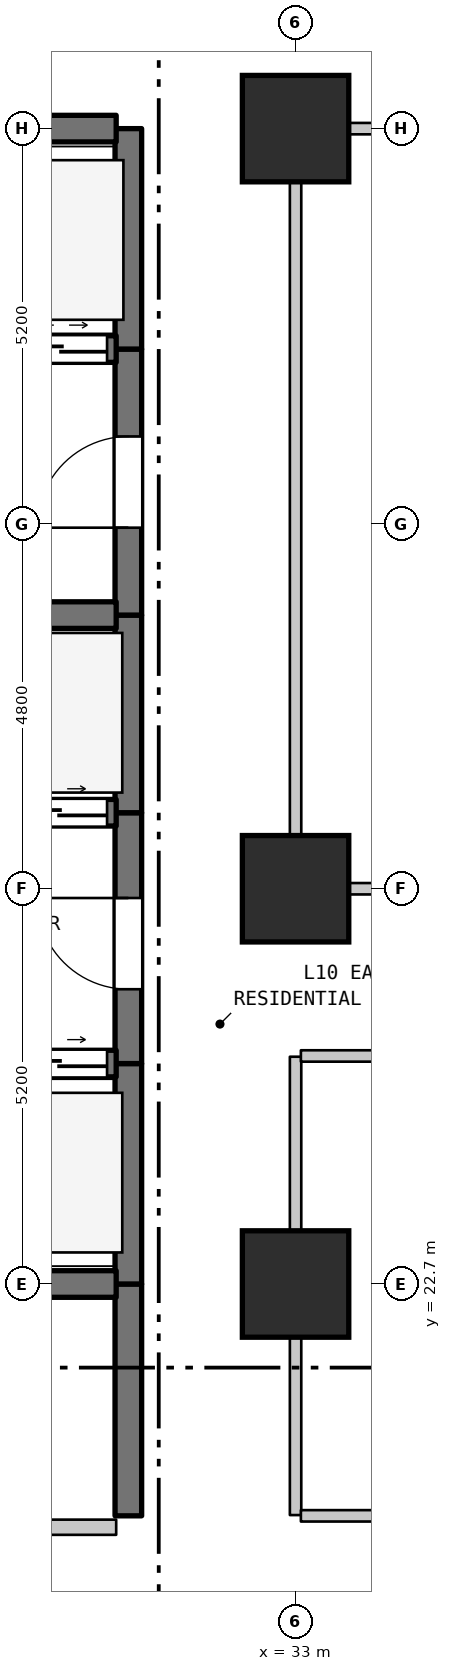
"""IFC4 building model, lengths in metres.
Left out: names, types, materials, properties, quantities, classifications, styles, units other than length and angle.
Written with IfcOpenShell. Run it as: python <this file> out.ifc"""

import sys

from ifc_helpers import new_model, si_unit, direction, frame, frame_2d, origin, origin_2d, place, context, subcontext, project, spatial, rectangle, extrude, element, fill, save


model = new_model("IFC4")
c1 = context("Model", 3, precision=1e-05, world=origin(), true_north=direction((0.0, 1.0)))
c2 = subcontext(c1, "Body", "Model", "MODEL_VIEW")
j1 = project(units=[si_unit("LENGTHUNIT", "METRE"), si_unit("PLANEANGLEUNIT", "RADIAN")], contexts=[c1])
p1 = place(None, origin())
s1 = spatial("IfcSite", under=j1, at=p1, CompositionType="ELEMENT")
p2 = place(p1, origin())
s2 = spatial("IfcBuilding", under=s1, at=p2, CompositionType="ELEMENT")
p3 = place(p2, frame((0.0, 0.0, 46.2)))
s3 = spatial("IfcBuildingStorey", under=s2, at=p3, CompositionType="ELEMENT", Elevation=46.2)
for number, where, z_axis, x_axis in (
    (1, (33.0, 22.7, 0.0), (0.0, 0.0, 1.0), (1.0, 0.0, 0.0)),
    (2, (33.0, 27.9, 0.0), (0.0, 0.0, 1.0), (1.0, 0.0, 0.0)),
    (3, (33.0, 37.9, 0.0), (0.0, 0.0, 1.0), (1.0, 0.0, 0.0)),
):
    element("IfcColumn", number, at=place(p3, frame(where, z_axis=z_axis, x_axis=x_axis)), inside=s3, PredefinedType="COLUMN", context=c2, shape_type="SweptSolid", body=[
        extrude(rectangle(XDim=1.4, YDim=1.4, at=origin_2d()), origin(), (0.0, 0.0, 1.0), 3.7),
    ])
p4 = place(p3, frame((30.8, 19.65, 0.0), z_axis=(0.0, 0.0, 1.0), x_axis=(0.0, 1.0, 0.0)))
e4 = element("IfcWall", 4, at=p4, inside=s3, PredefinedType="SHEAR", context=c2, shape_type="SweptSolid", body=[
    extrude(rectangle(XDim=3.05, YDim=0.35, at=frame_2d((1.525, 0.0))), origin(), (0.0, 0.0, 1.0), 3.385),
])
p5 = place(p3, frame((30.8, 22.7, 0.0), z_axis=(0.0, 0.0, 1.0), x_axis=(0.0, 1.0, 0.0)))
e5 = element("IfcWall", 5, at=p5, inside=s3, PredefinedType="SHEAR", context=c2, shape_type="SweptSolid", body=[
    extrude(rectangle(XDim=2.9, YDim=0.35, at=frame_2d((1.45, 0.0))), origin(), (0.0, 0.0, 1.0), 3.385),
])
p6 = place(p3, frame((30.8, 25.6, 0.0), z_axis=(0.0, 0.0, 1.0), x_axis=(0.0, 1.0, 0.0)))
e6 = element("IfcWall", 6, at=p6, inside=s3, PredefinedType="SHEAR", context=c2, shape_type="SweptSolid", body=[
    extrude(rectangle(XDim=3.3, YDim=0.35, at=frame_2d((1.65, 0.0))), origin(), (0.0, 0.0, 1.0), 3.385),
])
p7 = place(p6, frame((0.978, 0.0, 0.0)))
e7 = element("IfcOpeningElement", 7, at=p7, cuts=e6, PredefinedType="OPENING", context=c2, shape_type="SweptSolid", body=[
    extrude(rectangle(XDim=1.2, YDim=2.2, at=frame_2d((0.6, 1.1))), frame((0.0, 0.185, 0.0), z_axis=(0.0, -1.0, 0.0), x_axis=(1.0, 0.0, 0.0)), (0.0, 0.0, 1.0), 0.37),
])
p8 = place(p3, frame((30.8, 28.9, 0.0), z_axis=(0.0, 0.0, 1.0), x_axis=(0.0, 1.0, 0.0)))
e8 = element("IfcWall", 8, at=p8, inside=s3, PredefinedType="SHEAR", context=c2, shape_type="SweptSolid", body=[
    extrude(rectangle(XDim=2.6, YDim=0.35, at=frame_2d((1.3, 0.0))), origin(), (0.0, 0.0, 1.0), 3.385),
])
p9 = place(p3, frame((30.8, 31.5, 0.0), z_axis=(0.0, 0.0, 1.0), x_axis=(0.0, 1.0, 0.0)))
e9 = element("IfcWall", 9, at=p9, inside=s3, PredefinedType="SHEAR", context=c2, shape_type="SweptSolid", body=[
    extrude(rectangle(XDim=3.5, YDim=0.35, at=frame_2d((1.75, 0.0))), origin(), (0.0, 0.0, 1.0), 3.385),
])
p10 = place(p9, frame((1.15, 0.0, 0.0)))
e10 = element("IfcOpeningElement", 10, at=p10, cuts=e9, PredefinedType="OPENING", context=c2, shape_type="SweptSolid", body=[
    extrude(rectangle(XDim=1.2, YDim=2.2, at=frame_2d((0.6, 1.1))), frame((0.0, 0.185, 0.0), z_axis=(0.0, -1.0, 0.0), x_axis=(1.0, 0.0, 0.0)), (0.0, 0.0, 1.0), 0.37),
])
p11 = place(p3, frame((30.8, 35.0, 0.0), z_axis=(0.0, 0.0, 1.0), x_axis=(0.0, 1.0, 0.0)))
e11 = element("IfcWall", 11, at=p11, inside=s3, PredefinedType="SHEAR", context=c2, shape_type="SweptSolid", body=[
    extrude(rectangle(XDim=2.9, YDim=0.35, at=frame_2d((1.45, 0.0))), origin(), (0.0, 0.0, 1.0), 3.385),
])
p12 = place(p3, frame((33.0, 19.66, 0.0), z_axis=(0.0, 0.0, 1.0), x_axis=(0.0, 1.0, 0.0)))
e12 = element("IfcWall", 12, at=p12, inside=s3, PredefinedType="STANDARD", context=c2, shape_type="SweptSolid", body=[
    extrude(rectangle(XDim=6.03, YDim=0.15, at=frame_2d((3.015, 0.0))), origin(), (0.0, 0.0, 1.0), 2.885),
])
p13 = place(p3, frame((33.0, 27.91, 0.0), z_axis=(0.0, 0.0, 1.0), x_axis=(0.0, 1.0, 0.0)))
e13 = element("IfcWall", 13, at=p13, inside=s3, PredefinedType="STANDARD", context=c2, shape_type="SweptSolid", body=[
    extrude(rectangle(XDim=9.98, YDim=0.15, at=frame_2d((4.99, 0.0))), origin(), (0.0, 0.0, 1.0), 2.885),
])
p14 = place(p3, frame((25.985, 19.5, 0.0), z_axis=(0.0, 0.0, 1.0), x_axis=(1.0, 0.0, 0.0)))
e14 = element("IfcWall", 14, at=p14, inside=s3, PredefinedType="STANDARD", context=c2, shape_type="SweptSolid", body=[
    extrude(rectangle(XDim=4.655, YDim=0.2, at=frame_2d((2.327, 0.0))), origin(), (0.0, 0.0, 1.0), 3.385),
])
p15 = place(p14, frame((1.845, 0.0, 0.0)))
e15 = element("IfcOpeningElement", 15, at=p15, cuts=e14, PredefinedType="OPENING", context=c2, shape_type="SweptSolid", body=[
    extrude(rectangle(XDim=0.9, YDim=2.15, at=frame_2d((0.45, 1.075))), frame((0.0, 0.11, 0.0), z_axis=(0.0, -1.0, 0.0), x_axis=(1.0, 0.0, 0.0)), (0.0, 0.0, 1.0), 0.22),
])
p16 = place(p3, frame((33.07, 19.65, 0.0), z_axis=(0.0, 0.0, 1.0), x_axis=(1.0, 0.0, 0.0)))
e16 = element("IfcWall", 16, at=p16, inside=s3, PredefinedType="STANDARD", context=c2, shape_type="SweptSolid", body=[
    extrude(rectangle(XDim=33.27, YDim=0.15, at=frame_2d((16.635, 0.0))), origin(), (0.0, 0.0, 1.0), 3.385),
])
p17 = place(p16, frame((16.065, 0.0, 0.0)))
e17 = element("IfcOpeningElement", 17, at=p17, cuts=e16, PredefinedType="OPENING", context=c2, shape_type="SweptSolid", body=[
    extrude(rectangle(XDim=1.0, YDim=2.15, at=frame_2d((0.5, 1.075))), frame((0.0, 0.085, 0.0), z_axis=(0.0, -1.0, 0.0), x_axis=(1.0, 0.0, 0.0)), (0.0, 0.0, 1.0), 0.17),
])
p18 = place(p3, frame((27.46, 22.7, 0.0), z_axis=(0.0, 0.0, 1.0), x_axis=(1.0, 0.0, 0.0)))
e18 = element("IfcWall", 18, at=p18, inside=s3, PredefinedType="SHEAR", context=c2, shape_type="SweptSolid", body=[
    extrude(rectangle(XDim=3.18, YDim=0.35, at=frame_2d((1.59, 0.0))), origin(), (0.0, 0.0, 1.0), 3.385),
])
p19 = place(p3, frame((27.46, 25.6, 0.0), z_axis=(0.0, 0.0, 1.0), x_axis=(1.0, 0.0, 0.0)))
e19 = element("IfcWall", 19, at=p19, inside=s3, PredefinedType="SHEAR", context=c2, shape_type="SweptSolid", body=[
    extrude(rectangle(XDim=3.18, YDim=0.35, at=frame_2d((1.59, 0.0))), origin(), (0.0, 0.0, 1.0), 3.385),
])
p20 = place(p19, frame((0.12, 0.0, 0.0)))
e20 = element("IfcOpeningElement", 20, at=p20, cuts=e19, PredefinedType="OPENING", context=c2, shape_type="SweptSolid", body=[
    extrude(rectangle(XDim=1.25, YDim=2.2, at=frame_2d((0.625, 1.1))), frame((0.0, 0.185, 0.0), z_axis=(0.0, -1.0, 0.0), x_axis=(1.0, 0.0, 0.0)), (0.0, 0.0, 1.0), 0.37),
])
p21 = place(p19, frame((1.81, 0.0, 0.0)))
e21 = element("IfcOpeningElement", 21, at=p21, cuts=e19, PredefinedType="OPENING", context=c2, shape_type="SweptSolid", body=[
    extrude(rectangle(XDim=1.25, YDim=2.2, at=frame_2d((0.625, 1.1))), frame((0.0, 0.185, 0.0), z_axis=(0.0, -1.0, 0.0), x_axis=(1.0, 0.0, 0.0)), (0.0, 0.0, 1.0), 0.37),
])
p22 = place(p3, frame((33.07, 25.7, 0.0), z_axis=(0.0, 0.0, 1.0), x_axis=(1.0, 0.0, 0.0)))
e22 = element("IfcWall", 22, at=p22, inside=s3, PredefinedType="STANDARD", context=c2, shape_type="SweptSolid", body=[
    extrude(rectangle(XDim=30.87, YDim=0.15, at=frame_2d((15.435, 0.0))), origin(), (0.0, 0.0, 1.0), 3.385),
])
p23 = place(p3, frame((33.07, 27.9, 0.0), z_axis=(0.0, 0.0, 1.0), x_axis=(1.0, 0.0, 0.0)))
e23 = element("IfcWall", 23, at=p23, inside=s3, PredefinedType="STANDARD", context=c2, shape_type="SweptSolid", body=[
    extrude(rectangle(XDim=30.87, YDim=0.15, at=frame_2d((15.435, 0.0))), origin(), (0.0, 0.0, 1.0), 2.885),
])
p24 = place(p23, frame((14.935, 0.0, 0.0)))
e24 = element("IfcOpeningElement", 24, at=p24, cuts=e23, PredefinedType="OPENING", context=c2, shape_type="SweptSolid", body=[
    extrude(rectangle(XDim=1.0, YDim=2.15, at=frame_2d((0.5, 1.075))), frame((0.0, 0.085, 0.0), z_axis=(0.0, -1.0, 0.0), x_axis=(1.0, 0.0, 0.0)), (0.0, 0.0, 1.0), 0.17),
])
p25 = place(p3, frame((27.46, 28.9, 0.0), z_axis=(0.0, 0.0, 1.0), x_axis=(1.0, 0.0, 0.0)))
e25 = element("IfcWall", 25, at=p25, inside=s3, PredefinedType="SHEAR", context=c2, shape_type="SweptSolid", body=[
    extrude(rectangle(XDim=3.18, YDim=0.35, at=frame_2d((1.59, 0.0))), origin(), (0.0, 0.0, 1.0), 3.385),
])
p26 = place(p25, frame((0.12, 0.0, 0.0)))
e26 = element("IfcOpeningElement", 26, at=p26, cuts=e25, PredefinedType="OPENING", context=c2, shape_type="SweptSolid", body=[
    extrude(rectangle(XDim=1.25, YDim=2.2, at=frame_2d((0.625, 1.1))), frame((0.0, 0.185, 0.0), z_axis=(0.0, -1.0, 0.0), x_axis=(1.0, 0.0, 0.0)), (0.0, 0.0, 1.0), 0.37),
])
p27 = place(p25, frame((1.81, 0.0, 0.0)))
e27 = element("IfcOpeningElement", 27, at=p27, cuts=e25, PredefinedType="OPENING", context=c2, shape_type="SweptSolid", body=[
    extrude(rectangle(XDim=1.25, YDim=2.2, at=frame_2d((0.625, 1.1))), frame((0.0, 0.185, 0.0), z_axis=(0.0, -1.0, 0.0), x_axis=(1.0, 0.0, 0.0)), (0.0, 0.0, 1.0), 0.37),
])
p28 = place(p3, frame((27.46, 31.5, 0.0), z_axis=(0.0, 0.0, 1.0), x_axis=(1.0, 0.0, 0.0)))
e28 = element("IfcWall", 28, at=p28, inside=s3, PredefinedType="SHEAR", context=c2, shape_type="SweptSolid", body=[
    extrude(rectangle(XDim=3.18, YDim=0.35, at=frame_2d((1.59, 0.0))), origin(), (0.0, 0.0, 1.0), 3.385),
])
p29 = place(p3, frame((19.16, 35.0, 0.0), z_axis=(0.0, 0.0, 1.0), x_axis=(1.0, 0.0, 0.0)))
e29 = element("IfcWall", 29, at=p29, inside=s3, PredefinedType="SHEAR", context=c2, shape_type="SweptSolid", body=[
    extrude(rectangle(XDim=11.48, YDim=0.35, at=frame_2d((5.74, 0.0))), origin(), (0.0, 0.0, 1.0), 3.385),
])
p30 = place(p29, frame((0.365, 0.0, 0.0)))
e30 = element("IfcOpeningElement", 30, at=p30, cuts=e29, PredefinedType="OPENING", context=c2, shape_type="SweptSolid", body=[
    extrude(rectangle(XDim=1.35, YDim=2.2, at=frame_2d((0.675, 1.1))), frame((0.0, 0.185, 0.0), z_axis=(0.0, -1.0, 0.0), x_axis=(1.0, 0.0, 0.0)), (0.0, 0.0, 1.0), 0.37),
])
p31 = place(p29, frame((2.765, 0.0, 0.0)))
e31 = element("IfcOpeningElement", 31, at=p31, cuts=e29, PredefinedType="OPENING", context=c2, shape_type="SweptSolid", body=[
    extrude(rectangle(XDim=1.35, YDim=2.2, at=frame_2d((0.675, 1.1))), frame((0.0, 0.185, 0.0), z_axis=(0.0, -1.0, 0.0), x_axis=(1.0, 0.0, 0.0)), (0.0, 0.0, 1.0), 0.37),
])
p32 = place(p29, frame((4.915, 0.0, 0.0)))
e32 = element("IfcOpeningElement", 32, at=p32, cuts=e29, PredefinedType="OPENING", context=c2, shape_type="SweptSolid", body=[
    extrude(rectangle(XDim=1.2, YDim=2.2, at=frame_2d((0.6, 1.1))), frame((0.0, 0.185, 0.0), z_axis=(0.0, -1.0, 0.0), x_axis=(1.0, 0.0, 0.0)), (0.0, 0.0, 1.0), 0.37),
])
p33 = place(p29, frame((6.665, 0.0, 0.0)))
e33 = element("IfcOpeningElement", 33, at=p33, cuts=e29, PredefinedType="OPENING", context=c2, shape_type="SweptSolid", body=[
    extrude(rectangle(XDim=1.2, YDim=2.2, at=frame_2d((0.6, 1.1))), frame((0.0, 0.185, 0.0), z_axis=(0.0, -1.0, 0.0), x_axis=(1.0, 0.0, 0.0)), (0.0, 0.0, 1.0), 0.37),
])
p34 = place(p29, frame((8.415, 0.0, 0.0)))
e34 = element("IfcOpeningElement", 34, at=p34, cuts=e29, PredefinedType="OPENING", context=c2, shape_type="SweptSolid", body=[
    extrude(rectangle(XDim=1.2, YDim=2.2, at=frame_2d((0.6, 1.1))), frame((0.0, 0.185, 0.0), z_axis=(0.0, -1.0, 0.0), x_axis=(1.0, 0.0, 0.0)), (0.0, 0.0, 1.0), 0.37),
])
p35 = place(p29, frame((10.16, 0.0, 0.0)))
e35 = element("IfcOpeningElement", 35, at=p35, cuts=e29, PredefinedType="OPENING", context=c2, shape_type="SweptSolid", body=[
    extrude(rectangle(XDim=1.2, YDim=2.2, at=frame_2d((0.6, 1.1))), frame((0.0, 0.185, 0.0), z_axis=(0.0, -1.0, 0.0), x_axis=(1.0, 0.0, 0.0)), (0.0, 0.0, 1.0), 0.37),
])
p36 = place(p3, frame((19.16, 37.9, 0.0), z_axis=(0.0, 0.0, 1.0), x_axis=(1.0, 0.0, 0.0)))
e36 = element("IfcWall", 36, at=p36, inside=s3, PredefinedType="SHEAR", context=c2, shape_type="SweptSolid", body=[
    extrude(rectangle(XDim=11.48, YDim=0.35, at=frame_2d((5.74, 0.0))), origin(), (0.0, 0.0, 1.0), 3.385),
])
p37 = place(p3, frame((33.07, 37.9, 0.0), z_axis=(0.0, 0.0, 1.0), x_axis=(1.0, 0.0, 0.0)))
e37 = element("IfcWall", 37, at=p37, inside=s3, PredefinedType="STANDARD", context=c2, shape_type="SweptSolid", body=[
    extrude(rectangle(XDim=26.935, YDim=0.15, at=frame_2d((13.467, 0.0))), origin(), (0.0, 0.0, 1.0), 3.385),
])
p38 = place(p7, origin())
e38 = element("IfcDoor", 38, at=p38, inside=s3, OperationType="SINGLE_SWING_RIGHT", PredefinedType="DOOR", context=c2, shape_type="SweptSolid", body=[
    extrude(rectangle(XDim=1.2, YDim=2.2, at=frame_2d((0.6, 1.1))), frame((0.0, 0.025, 0.0), z_axis=(0.0, -1.0, 0.0), x_axis=(1.0, 0.0, 0.0)), (0.0, 0.0, 1.0), 0.05),
])
fill(e7, e38)
p39 = place(p10, origin())
e39 = element("IfcDoor", 39, at=p39, inside=s3, OperationType="SINGLE_SWING_LEFT", PredefinedType="DOOR", context=c2, shape_type="SweptSolid", body=[
    extrude(rectangle(XDim=1.2, YDim=2.2, at=frame_2d((0.6, 1.1))), frame((0.0, 0.025, 0.0), z_axis=(0.0, -1.0, 0.0), x_axis=(1.0, 0.0, 0.0)), (0.0, 0.0, 1.0), 0.05),
])
fill(e10, e39)
p40 = place(p21, origin())
e40 = element("IfcDoor", 40, at=p40, inside=s3, OperationType="DOUBLE_DOOR_SLIDING", PredefinedType="DOOR", context=c2, shape_type="SweptSolid", body=[
    extrude(rectangle(XDim=1.25, YDim=2.2, at=frame_2d((0.625, 1.1))), frame((0.0, 0.025, 0.0), z_axis=(0.0, -1.0, 0.0), x_axis=(1.0, 0.0, 0.0)), (0.0, 0.0, 1.0), 0.05),
])
fill(e21, e40)
p41 = place(p27, origin())
e41 = element("IfcDoor", 41, at=p41, inside=s3, OperationType="DOUBLE_DOOR_SLIDING", PredefinedType="DOOR", context=c2, shape_type="SweptSolid", body=[
    extrude(rectangle(XDim=1.25, YDim=2.2, at=frame_2d((0.625, 1.1))), frame((0.0, 0.025, 0.0), z_axis=(0.0, -1.0, 0.0), x_axis=(1.0, 0.0, 0.0)), (0.0, 0.0, 1.0), 0.05),
])
fill(e27, e41)
p42 = place(p35, origin())
e42 = element("IfcDoor", 42, at=p42, inside=s3, OperationType="DOUBLE_DOOR_SLIDING", PredefinedType="DOOR", context=c2, shape_type="SweptSolid", body=[
    extrude(rectangle(XDim=1.2, YDim=2.2, at=frame_2d((0.6, 1.1))), frame((0.0, 0.025, 0.0), z_axis=(0.0, -1.0, 0.0), x_axis=(1.0, 0.0, 0.0)), (0.0, 0.0, 1.0), 0.05),
])
fill(e35, e42)
save(model, sys.argv[1])
